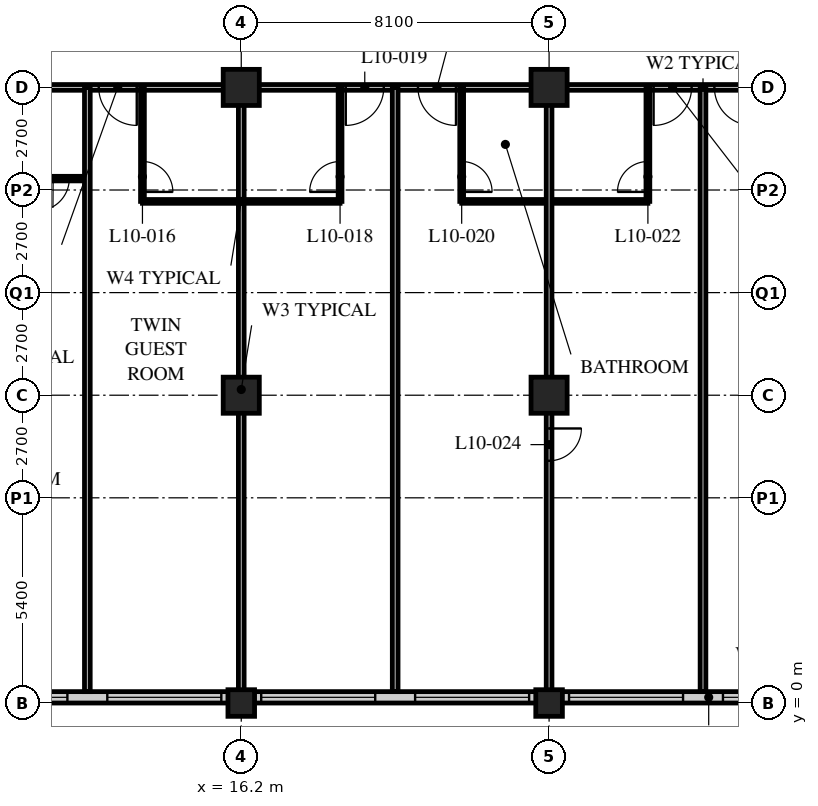
"""IFC4 building model, lengths in metres.
Left out: names, types, materials, properties, quantities, classifications, styles, units other than length and angle.
Written with IfcOpenShell. Run it as: python <this file> out.ifc"""

import sys

from ifc_helpers import new_model, si_unit, direction, frame, frame_2d, origin, origin_2d, place, context, subcontext, project, spatial, rectangle, hollow_rectangle, extrude, element, fill, save


model = new_model("IFC4")
c1 = context("Model", 3, precision=1e-05, world=origin(), true_north=direction((0.0, 1.0)))
c2 = subcontext(c1, "Body", "Model", "MODEL_VIEW")
j1 = project(units=[si_unit("LENGTHUNIT", "METRE"), si_unit("PLANEANGLEUNIT", "RADIAN")], contexts=[c1])
p1 = place(None, origin())
s1 = spatial("IfcSite", under=j1, at=p1, CompositionType="ELEMENT")
p2 = place(p1, origin())
s2 = spatial("IfcBuilding", under=s1, at=p2, CompositionType="ELEMENT")
p3 = place(p2, frame((0.0, 0.0, 46.6)))
s3 = spatial("IfcBuildingStorey", under=s2, at=p3, CompositionType="ELEMENT", Elevation=46.6)
p4 = place(p3, frame((16.2, 0.0, 0.0), z_axis=(0.0, 0.0, 1.0), x_axis=(1.0, 0.0, 0.0)))
e1 = element("IfcColumn", 1, at=p4, inside=s3, PredefinedType="COLUMN", context=c2, shape_type="SweptSolid", body=[
    extrude(hollow_rectangle(XDim=0.7, YDim=0.7, WallThickness=0.06, at=origin_2d()), origin(), (0.0, 0.0, 1.0), 3.4),
])
for number, where, z_axis, x_axis in (
    (2, (16.2, 8.1, 0.0), (0.0, 0.0, 1.0), (1.0, 0.0, 0.0)),
    (3, (16.2, 16.2, 0.0), (0.0, 0.0, 1.0), (1.0, 0.0, 0.0)),
):
    element("IfcColumn", number, at=place(p3, frame(where, z_axis=z_axis, x_axis=x_axis)), inside=s3, PredefinedType="COLUMN", context=c2, shape_type="SweptSolid", body=[
        extrude(hollow_rectangle(XDim=0.95, YDim=0.95, WallThickness=0.095, at=origin_2d()), origin(), (0.0, 0.0, 1.0), 3.4),
    ])
p5 = place(p3, frame((24.3, 0.0, 0.0), z_axis=(0.0, 0.0, 1.0), x_axis=(1.0, 0.0, 0.0)))
e4 = element("IfcColumn", 4, at=p5, inside=s3, PredefinedType="COLUMN", context=c2, shape_type="SweptSolid", body=[
    extrude(hollow_rectangle(XDim=0.7, YDim=0.7, WallThickness=0.06, at=origin_2d()), origin(), (0.0, 0.0, 1.0), 3.4),
])
for number, where, z_axis, x_axis in (
    (5, (24.3, 8.1, 0.0), (0.0, 0.0, 1.0), (1.0, 0.0, 0.0)),
    (6, (24.3, 16.2, 0.0), (0.0, 0.0, 1.0), (1.0, 0.0, 0.0)),
):
    element("IfcColumn", number, at=place(p3, frame(where, z_axis=z_axis, x_axis=x_axis)), inside=s3, PredefinedType="COLUMN", context=c2, shape_type="SweptSolid", body=[
        extrude(hollow_rectangle(XDim=0.95, YDim=0.95, WallThickness=0.095, at=origin_2d()), origin(), (0.0, 0.0, 1.0), 3.4),
    ])
p6 = place(p3, frame((8.4, 0.15, 0.0), z_axis=(0.0, 0.0, 1.0), x_axis=(1.0, 0.0, 0.0)))
e7 = element("IfcWall", 7, at=p6, inside=s3, PredefinedType="SOLIDWALL", context=c2, shape_type="SweptSolid", body=[
    extrude(rectangle(XDim=40.2, YDim=0.3, at=frame_2d((20.1, 0.0))), origin(), (0.0, 0.0, 1.0), 3.19),
])
p7 = place(p6, frame((0.225, 0.0, 0.9)))
e8 = element("IfcOpeningElement", 8, at=p7, cuts=e7, PredefinedType="OPENING", context=c2, shape_type="SweptSolid", body=[
    extrude(rectangle(XDim=3.0, YDim=2.0, at=frame_2d((1.5, 1.0))), frame((0.0, 0.16, 0.0), z_axis=(0.0, -1.0, 0.0), x_axis=(1.0, 0.0, 0.0)), (0.0, 0.0, 1.0), 0.32),
])
p8 = place(p6, frame((4.275, 0.0, 0.9)))
e9 = element("IfcOpeningElement", 9, at=p8, cuts=e7, PredefinedType="OPENING", context=c2, shape_type="SweptSolid", body=[
    extrude(rectangle(XDim=3.0, YDim=2.0, at=frame_2d((1.5, 1.0))), frame((0.0, 0.16, 0.0), z_axis=(0.0, -1.0, 0.0), x_axis=(1.0, 0.0, 0.0)), (0.0, 0.0, 1.0), 0.32),
])
p9 = place(p6, frame((8.325, 0.0, 0.9)))
e10 = element("IfcOpeningElement", 10, at=p9, cuts=e7, PredefinedType="OPENING", context=c2, shape_type="SweptSolid", body=[
    extrude(rectangle(XDim=3.0, YDim=2.0, at=frame_2d((1.5, 1.0))), frame((0.0, 0.16, 0.0), z_axis=(0.0, -1.0, 0.0), x_axis=(1.0, 0.0, 0.0)), (0.0, 0.0, 1.0), 0.32),
])
p10 = place(p6, frame((12.375, 0.0, 0.9)))
e11 = element("IfcOpeningElement", 11, at=p10, cuts=e7, PredefinedType="OPENING", context=c2, shape_type="SweptSolid", body=[
    extrude(rectangle(XDim=3.0, YDim=2.0, at=frame_2d((1.5, 1.0))), frame((0.0, 0.16, 0.0), z_axis=(0.0, -1.0, 0.0), x_axis=(1.0, 0.0, 0.0)), (0.0, 0.0, 1.0), 0.32),
])
p11 = place(p6, frame((16.425, 0.0, 0.9)))
e12 = element("IfcOpeningElement", 12, at=p11, cuts=e7, PredefinedType="OPENING", context=c2, shape_type="SweptSolid", body=[
    extrude(rectangle(XDim=3.0, YDim=2.0, at=frame_2d((1.5, 1.0))), frame((0.0, 0.16, 0.0), z_axis=(0.0, -1.0, 0.0), x_axis=(1.0, 0.0, 0.0)), (0.0, 0.0, 1.0), 0.32),
])
p12 = place(p6, frame((20.475, 0.0, 0.9)))
e13 = element("IfcOpeningElement", 13, at=p12, cuts=e7, PredefinedType="OPENING", context=c2, shape_type="SweptSolid", body=[
    extrude(rectangle(XDim=3.0, YDim=2.0, at=frame_2d((1.5, 1.0))), frame((0.0, 0.16, 0.0), z_axis=(0.0, -1.0, 0.0), x_axis=(1.0, 0.0, 0.0)), (0.0, 0.0, 1.0), 0.32),
])
p13 = place(p6, frame((24.525, 0.0, 0.9)))
e14 = element("IfcOpeningElement", 14, at=p13, cuts=e7, PredefinedType="OPENING", context=c2, shape_type="SweptSolid", body=[
    extrude(rectangle(XDim=3.0, YDim=2.0, at=frame_2d((1.5, 1.0))), frame((0.0, 0.16, 0.0), z_axis=(0.0, -1.0, 0.0), x_axis=(1.0, 0.0, 0.0)), (0.0, 0.0, 1.0), 0.32),
])
p14 = place(p6, frame((28.575, 0.0, 0.9)))
e15 = element("IfcOpeningElement", 15, at=p14, cuts=e7, PredefinedType="OPENING", context=c2, shape_type="SweptSolid", body=[
    extrude(rectangle(XDim=3.0, YDim=2.0, at=frame_2d((1.5, 1.0))), frame((0.0, 0.16, 0.0), z_axis=(0.0, -1.0, 0.0), x_axis=(1.0, 0.0, 0.0)), (0.0, 0.0, 1.0), 0.32),
])
p15 = place(p6, frame((32.625, 0.0, 0.9)))
e16 = element("IfcOpeningElement", 16, at=p15, cuts=e7, PredefinedType="OPENING", context=c2, shape_type="SweptSolid", body=[
    extrude(rectangle(XDim=3.0, YDim=2.0, at=frame_2d((1.5, 1.0))), frame((0.0, 0.16, 0.0), z_axis=(0.0, -1.0, 0.0), x_axis=(1.0, 0.0, 0.0)), (0.0, 0.0, 1.0), 0.32),
])
p16 = place(p6, frame((36.675, 0.0, 0.9)))
e17 = element("IfcOpeningElement", 17, at=p16, cuts=e7, PredefinedType="OPENING", context=c2, shape_type="SweptSolid", body=[
    extrude(rectangle(XDim=3.0, YDim=2.0, at=frame_2d((1.5, 1.0))), frame((0.0, 0.16, 0.0), z_axis=(0.0, -1.0, 0.0), x_axis=(1.0, 0.0, 0.0)), (0.0, 0.0, 1.0), 0.32),
])
p17 = place(p3, frame((8.1, 16.2, 0.0), z_axis=(0.0, 0.0, 1.0), x_axis=(1.0, 0.0, 0.0)))
e18 = element("IfcWall", 18, at=p17, inside=s3, PredefinedType="PARTITIONING", context=c2, shape_type="SweptSolid", body=[
    extrude(rectangle(XDim=40.5, YDim=0.15, at=frame_2d((20.25, 0.0))), origin(), (0.0, 0.0, 1.0), 2.578),
])
p18 = place(p17, frame((4.35, 0.0, 0.0)))
e19 = element("IfcOpeningElement", 19, at=p18, cuts=e18, PredefinedType="OPENING", context=c2, shape_type="SweptSolid", body=[
    extrude(rectangle(XDim=1.0, YDim=2.1, at=frame_2d((0.5, 1.05))), frame((0.0, 0.085, 0.0), z_axis=(0.0, -1.0, 0.0), x_axis=(1.0, 0.0, 0.0)), (0.0, 0.0, 1.0), 0.17),
])
p19 = place(p17, frame((10.85, 0.0, 0.0)))
e20 = element("IfcOpeningElement", 20, at=p19, cuts=e18, PredefinedType="OPENING", context=c2, shape_type="SweptSolid", body=[
    extrude(rectangle(XDim=1.0, YDim=2.1, at=frame_2d((0.5, 1.05))), frame((0.0, 0.085, 0.0), z_axis=(0.0, -1.0, 0.0), x_axis=(1.0, 0.0, 0.0)), (0.0, 0.0, 1.0), 0.17),
])
p20 = place(p17, frame((12.75, 0.0, 0.0)))
e21 = element("IfcOpeningElement", 21, at=p20, cuts=e18, PredefinedType="OPENING", context=c2, shape_type="SweptSolid", body=[
    extrude(rectangle(XDim=1.0, YDim=2.1, at=frame_2d((0.5, 1.05))), frame((0.0, 0.085, 0.0), z_axis=(0.0, -1.0, 0.0), x_axis=(1.0, 0.0, 0.0)), (0.0, 0.0, 1.0), 0.17),
])
p21 = place(p17, frame((18.95, 0.0, 0.0)))
e22 = element("IfcOpeningElement", 22, at=p21, cuts=e18, PredefinedType="OPENING", context=c2, shape_type="SweptSolid", body=[
    extrude(rectangle(XDim=1.0, YDim=2.1, at=frame_2d((0.5, 1.05))), frame((0.0, 0.085, 0.0), z_axis=(0.0, -1.0, 0.0), x_axis=(1.0, 0.0, 0.0)), (0.0, 0.0, 1.0), 0.17),
])
p22 = place(p17, frame((20.55, 0.0, 0.0)))
e23 = element("IfcOpeningElement", 23, at=p22, cuts=e18, PredefinedType="OPENING", context=c2, shape_type="SweptSolid", body=[
    extrude(rectangle(XDim=1.0, YDim=2.1, at=frame_2d((0.5, 1.05))), frame((0.0, 0.085, 0.0), z_axis=(0.0, -1.0, 0.0), x_axis=(1.0, 0.0, 0.0)), (0.0, 0.0, 1.0), 0.17),
])
p23 = place(p17, frame((27.05, 0.0, 0.0)))
e24 = element("IfcOpeningElement", 24, at=p23, cuts=e18, PredefinedType="OPENING", context=c2, shape_type="SweptSolid", body=[
    extrude(rectangle(XDim=1.0, YDim=2.1, at=frame_2d((0.5, 1.05))), frame((0.0, 0.085, 0.0), z_axis=(0.0, -1.0, 0.0), x_axis=(1.0, 0.0, 0.0)), (0.0, 0.0, 1.0), 0.17),
])
p24 = place(p17, frame((28.95, 0.0, 0.0)))
e25 = element("IfcOpeningElement", 25, at=p24, cuts=e18, PredefinedType="OPENING", context=c2, shape_type="SweptSolid", body=[
    extrude(rectangle(XDim=1.0, YDim=2.1, at=frame_2d((0.5, 1.05))), frame((0.0, 0.085, 0.0), z_axis=(0.0, -1.0, 0.0), x_axis=(1.0, 0.0, 0.0)), (0.0, 0.0, 1.0), 0.17),
])
p25 = place(p17, frame((34.85, 0.0, 0.0)))
e26 = element("IfcOpeningElement", 26, at=p25, cuts=e18, PredefinedType="OPENING", context=c2, shape_type="SweptSolid", body=[
    extrude(rectangle(XDim=1.0, YDim=2.1, at=frame_2d((0.5, 1.05))), frame((0.0, 0.085, 0.0), z_axis=(0.0, -1.0, 0.0), x_axis=(1.0, 0.0, 0.0)), (0.0, 0.0, 1.0), 0.17),
])
p26 = place(p17, frame((1.525, 0.0, 0.0)))
e27 = element("IfcOpeningElement", 27, at=p26, cuts=e18, PredefinedType="OPENING", context=c2, shape_type="SweptSolid", body=[
    extrude(rectangle(XDim=1.0, YDim=2.1, at=frame_2d((0.5, 1.05))), frame((0.0, 0.085, 0.0), z_axis=(0.0, -1.0, 0.0), x_axis=(1.0, 0.0, 0.0)), (0.0, 0.0, 1.0), 0.17),
])
p27 = place(p17, frame((37.975, 0.0, 0.0)))
e28 = element("IfcOpeningElement", 28, at=p27, cuts=e18, PredefinedType="OPENING", context=c2, shape_type="SweptSolid", body=[
    extrude(rectangle(XDim=1.0, YDim=2.1, at=frame_2d((0.5, 1.05))), frame((0.0, 0.085, 0.0), z_axis=(0.0, -1.0, 0.0), x_axis=(1.0, 0.0, 0.0)), (0.0, 0.0, 1.0), 0.17),
])
p28 = place(p3, frame((13.6, 13.2, 0.0), z_axis=(0.0, 0.0, 1.0), x_axis=(1.0, 0.0, 0.0)))
e29 = element("IfcWall", 29, at=p28, inside=s3, PredefinedType="PARTITIONING", context=c2, shape_type="SweptSolid", body=[
    extrude(rectangle(XDim=5.2, YDim=0.1, at=frame_2d((2.6, 0.0))), origin(), (0.0, 0.0, 1.0), 3.19),
])
p29 = place(p3, frame((13.6, 16.2, 0.0), z_axis=(0.0, 0.0, 1.0), x_axis=(0.0, -1.0, 0.0)))
e30 = element("IfcWall", 30, at=p29, inside=s3, PredefinedType="PARTITIONING", context=c2, shape_type="SweptSolid", body=[
    extrude(rectangle(XDim=3.0, YDim=0.1, at=frame_2d((1.5, 0.0))), origin(), (0.0, 0.0, 1.0), 3.19),
])
p30 = place(p29, frame((1.95, 0.0, 0.0)))
e31 = element("IfcOpeningElement", 31, at=p30, cuts=e30, PredefinedType="OPENING", context=c2, shape_type="SweptSolid", body=[
    extrude(rectangle(XDim=0.8, YDim=2.1, at=frame_2d((0.4, 1.05))), frame((0.0, 0.06, 0.0), z_axis=(0.0, -1.0, 0.0), x_axis=(1.0, 0.0, 0.0)), (0.0, 0.0, 1.0), 0.12),
])
p31 = place(p3, frame((16.2, 16.2, 0.0), z_axis=(0.0, 0.0, 1.0), x_axis=(0.0, -1.0, 0.0)))
e32 = element("IfcWall", 32, at=p31, inside=s3, PredefinedType="PARTITIONING", context=c2, shape_type="SweptSolid", body=[
    extrude(rectangle(XDim=15.9, YDim=0.15, at=frame_2d((7.95, 0.0))), origin(), (0.0, 0.0, 1.0), 2.578),
])
p32 = place(p3, frame((18.8, 16.2, 0.0), z_axis=(0.0, 0.0, 1.0), x_axis=(0.0, -1.0, 0.0)))
e33 = element("IfcWall", 33, at=p32, inside=s3, PredefinedType="PARTITIONING", context=c2, shape_type="SweptSolid", body=[
    extrude(rectangle(XDim=3.0, YDim=0.1, at=frame_2d((1.5, 0.0))), origin(), (0.0, 0.0, 1.0), 3.19),
])
p33 = place(p32, frame((1.95, 0.0, 0.0)))
e34 = element("IfcOpeningElement", 34, at=p33, cuts=e33, PredefinedType="OPENING", context=c2, shape_type="SweptSolid", body=[
    extrude(rectangle(XDim=0.8, YDim=2.1, at=frame_2d((0.4, 1.05))), frame((0.0, 0.06, 0.0), z_axis=(0.0, -1.0, 0.0), x_axis=(1.0, 0.0, 0.0)), (0.0, 0.0, 1.0), 0.12),
])
p34 = place(p3, frame((20.25, 16.2, 0.0), z_axis=(0.0, 0.0, 1.0), x_axis=(0.0, -1.0, 0.0)))
e35 = element("IfcWall", 35, at=p34, inside=s3, PredefinedType="PARTITIONING", context=c2, shape_type="SweptSolid", body=[
    extrude(rectangle(XDim=15.9, YDim=0.15, at=frame_2d((7.95, 0.0))), origin(), (0.0, 0.0, 1.0), 3.19),
])
p35 = place(p3, frame((22.0, 13.2, 0.0), z_axis=(0.0, 0.0, 1.0), x_axis=(1.0, 0.0, 0.0)))
e36 = element("IfcWall", 36, at=p35, inside=s3, PredefinedType="PARTITIONING", context=c2, shape_type="SweptSolid", body=[
    extrude(rectangle(XDim=4.9, YDim=0.1, at=frame_2d((2.45, 0.0))), origin(), (0.0, 0.0, 1.0), 3.19),
])
p36 = place(p3, frame((22.0, 16.2, 0.0), z_axis=(0.0, 0.0, 1.0), x_axis=(0.0, -1.0, 0.0)))
e37 = element("IfcWall", 37, at=p36, inside=s3, PredefinedType="PARTITIONING", context=c2, shape_type="SweptSolid", body=[
    extrude(rectangle(XDim=3.0, YDim=0.1, at=frame_2d((1.5, 0.0))), origin(), (0.0, 0.0, 1.0), 3.19),
])
p37 = place(p36, frame((1.95, 0.0, 0.0)))
e38 = element("IfcOpeningElement", 38, at=p37, cuts=e37, PredefinedType="OPENING", context=c2, shape_type="SweptSolid", body=[
    extrude(rectangle(XDim=0.8, YDim=2.1, at=frame_2d((0.4, 1.05))), frame((0.0, 0.06, 0.0), z_axis=(0.0, -1.0, 0.0), x_axis=(1.0, 0.0, 0.0)), (0.0, 0.0, 1.0), 0.12),
])
p38 = place(p3, frame((26.9, 16.2, 0.0), z_axis=(0.0, 0.0, 1.0), x_axis=(0.0, -1.0, 0.0)))
e39 = element("IfcWall", 39, at=p38, inside=s3, PredefinedType="PARTITIONING", context=c2, shape_type="SweptSolid", body=[
    extrude(rectangle(XDim=3.0, YDim=0.1, at=frame_2d((1.5, 0.0))), origin(), (0.0, 0.0, 1.0), 3.19),
])
p39 = place(p38, frame((1.95, 0.0, 0.0)))
e40 = element("IfcOpeningElement", 40, at=p39, cuts=e39, PredefinedType="OPENING", context=c2, shape_type="SweptSolid", body=[
    extrude(rectangle(XDim=0.8, YDim=2.1, at=frame_2d((0.4, 1.05))), frame((0.0, 0.06, 0.0), z_axis=(0.0, -1.0, 0.0), x_axis=(1.0, 0.0, 0.0)), (0.0, 0.0, 1.0), 0.12),
])
p40 = place(p3, frame((24.3, 16.2, 0.0), z_axis=(0.0, 0.0, 1.0), x_axis=(0.0, -1.0, 0.0)))
e41 = element("IfcWall", 41, at=p40, inside=s3, PredefinedType="PARTITIONING", context=c2, shape_type="SweptSolid", body=[
    extrude(rectangle(XDim=15.9, YDim=0.15, at=frame_2d((7.95, 0.0))), origin(), (0.0, 0.0, 1.0), 2.578),
])
p41 = place(p40, frame((8.975, 0.0, 0.0)))
e42 = element("IfcOpeningElement", 42, at=p41, cuts=e41, PredefinedType="OPENING", context=c2, shape_type="SweptSolid", body=[
    extrude(rectangle(XDim=0.85, YDim=2.1, at=frame_2d((0.425, 1.05))), frame((0.0, 0.085, 0.0), z_axis=(0.0, -1.0, 0.0), x_axis=(1.0, 0.0, 0.0)), (0.0, 0.0, 1.0), 0.17),
])
p42 = place(p3, frame((28.35, 16.2, 0.0), z_axis=(0.0, 0.0, 1.0), x_axis=(0.0, -1.0, 0.0)))
e43 = element("IfcWall", 43, at=p42, inside=s3, PredefinedType="PARTITIONING", context=c2, shape_type="SweptSolid", body=[
    extrude(rectangle(XDim=15.9, YDim=0.15, at=frame_2d((7.95, 0.0))), origin(), (0.0, 0.0, 1.0), 3.19),
])
p43 = place(p3, frame((4.1, 13.8, 0.0), z_axis=(0.0, 0.0, 1.0), x_axis=(1.0, 0.0, 0.0)))
e44 = element("IfcWall", 44, at=p43, inside=s3, PredefinedType="PARTITIONING", context=c2, shape_type="SweptSolid", body=[
    extrude(rectangle(XDim=8.05, YDim=0.12, at=frame_2d((4.025, 0.0))), origin(), (0.0, 0.0, 1.0), 3.19),
])
p44 = place(p43, frame((6.725, 0.0, 0.0)))
e45 = element("IfcOpeningElement", 45, at=p44, cuts=e44, PredefinedType="OPENING", context=c2, shape_type="SweptSolid", body=[
    extrude(rectangle(XDim=0.85, YDim=2.1, at=frame_2d((0.425, 1.05))), frame((0.0, 0.07, 0.0), z_axis=(0.0, -1.0, 0.0), x_axis=(1.0, 0.0, 0.0)), (0.0, 0.0, 1.0), 0.14),
])
p45 = place(p43, frame((2.875, 0.0, 0.0)))
e46 = element("IfcOpeningElement", 46, at=p45, cuts=e44, PredefinedType="OPENING", context=c2, shape_type="SweptSolid", body=[
    extrude(rectangle(XDim=0.85, YDim=2.1, at=frame_2d((0.425, 1.05))), frame((0.0, 0.07, 0.0), z_axis=(0.0, -1.0, 0.0), x_axis=(1.0, 0.0, 0.0)), (0.0, 0.0, 1.0), 0.14),
])
p46 = place(p3, frame((12.15, 16.2, 0.0), z_axis=(0.0, 0.0, 1.0), x_axis=(0.0, -1.0, 0.0)))
e47 = element("IfcWall", 47, at=p46, inside=s3, PredefinedType="PARTITIONING", context=c2, shape_type="SweptSolid", body=[
    extrude(rectangle(XDim=15.9, YDim=0.15, at=frame_2d((7.95, 0.0))), origin(), (0.0, 0.0, 1.0), 3.19),
])
p47 = place(p7, origin())
e48 = element("IfcWindow", 48, at=p47, inside=s3, PartitioningType="SINGLE_PANEL", PredefinedType="WINDOW", context=c2, shape_type="SweptSolid", body=[
    extrude(rectangle(XDim=3.0, YDim=2.0, at=frame_2d((1.5, 1.0))), frame((0.0, 0.03, 0.0), z_axis=(0.0, -1.0, 0.0), x_axis=(1.0, 0.0, 0.0)), (0.0, 0.0, 1.0), 0.06),
])
fill(e8, e48)
p48 = place(p8, origin())
e49 = element("IfcWindow", 49, at=p48, inside=s3, PartitioningType="SINGLE_PANEL", PredefinedType="WINDOW", context=c2, shape_type="SweptSolid", body=[
    extrude(rectangle(XDim=3.0, YDim=2.0, at=frame_2d((1.5, 1.0))), frame((0.0, 0.03, 0.0), z_axis=(0.0, -1.0, 0.0), x_axis=(1.0, 0.0, 0.0)), (0.0, 0.0, 1.0), 0.06),
])
fill(e9, e49)
p49 = place(p9, origin())
e50 = element("IfcWindow", 50, at=p49, inside=s3, PartitioningType="SINGLE_PANEL", PredefinedType="WINDOW", context=c2, shape_type="SweptSolid", body=[
    extrude(rectangle(XDim=3.0, YDim=2.0, at=frame_2d((1.5, 1.0))), frame((0.0, 0.03, 0.0), z_axis=(0.0, -1.0, 0.0), x_axis=(1.0, 0.0, 0.0)), (0.0, 0.0, 1.0), 0.06),
])
fill(e10, e50)
p50 = place(p10, origin())
e51 = element("IfcWindow", 51, at=p50, inside=s3, PartitioningType="SINGLE_PANEL", PredefinedType="WINDOW", context=c2, shape_type="SweptSolid", body=[
    extrude(rectangle(XDim=3.0, YDim=2.0, at=frame_2d((1.5, 1.0))), frame((0.0, 0.03, 0.0), z_axis=(0.0, -1.0, 0.0), x_axis=(1.0, 0.0, 0.0)), (0.0, 0.0, 1.0), 0.06),
])
fill(e11, e51)
p51 = place(p11, origin())
e52 = element("IfcWindow", 52, at=p51, inside=s3, PartitioningType="SINGLE_PANEL", PredefinedType="WINDOW", context=c2, shape_type="SweptSolid", body=[
    extrude(rectangle(XDim=3.0, YDim=2.0, at=frame_2d((1.5, 1.0))), frame((0.0, 0.03, 0.0), z_axis=(0.0, -1.0, 0.0), x_axis=(1.0, 0.0, 0.0)), (0.0, 0.0, 1.0), 0.06),
])
fill(e12, e52)
p52 = place(p12, origin())
e53 = element("IfcWindow", 53, at=p52, inside=s3, PartitioningType="SINGLE_PANEL", PredefinedType="WINDOW", context=c2, shape_type="SweptSolid", body=[
    extrude(rectangle(XDim=3.0, YDim=2.0, at=frame_2d((1.5, 1.0))), frame((0.0, 0.03, 0.0), z_axis=(0.0, -1.0, 0.0), x_axis=(1.0, 0.0, 0.0)), (0.0, 0.0, 1.0), 0.06),
])
fill(e13, e53)
p53 = place(p30, origin())
e54 = element("IfcDoor", 54, at=p53, inside=s3, OperationType="SINGLE_SWING_RIGHT", PredefinedType="DOOR", context=c2, shape_type="SweptSolid", body=[
    extrude(rectangle(XDim=0.8, YDim=2.1, at=frame_2d((0.4, 1.05))), frame((0.0, 0.025, 0.0), z_axis=(0.0, -1.0, 0.0), x_axis=(1.0, 0.0, 0.0)), (0.0, 0.0, 1.0), 0.05),
])
fill(e31, e54)
p54 = place(p18, origin())
e55 = element("IfcDoor", 55, at=p54, inside=s3, OperationType="SINGLE_SWING_LEFT", PredefinedType="DOOR", context=c2, shape_type="SweptSolid", body=[
    extrude(rectangle(XDim=1.0, YDim=2.1, at=frame_2d((0.5, 1.05))), frame((0.0, 0.025, 0.0), z_axis=(0.0, -1.0, 0.0), x_axis=(1.0, 0.0, 0.0)), (0.0, 0.0, 1.0), 0.05),
])
fill(e19, e55)
p55 = place(p33, origin())
e56 = element("IfcDoor", 56, at=p55, inside=s3, OperationType="SINGLE_SWING_LEFT", PredefinedType="DOOR", context=c2, shape_type="SweptSolid", body=[
    extrude(rectangle(XDim=0.8, YDim=2.1, at=frame_2d((0.4, 1.05))), frame((0.0, 0.025, 0.0), z_axis=(0.0, -1.0, 0.0), x_axis=(1.0, 0.0, 0.0)), (0.0, 0.0, 1.0), 0.05),
])
fill(e34, e56)
p56 = place(p19, origin())
e57 = element("IfcDoor", 57, at=p56, inside=s3, OperationType="SINGLE_SWING_RIGHT", PredefinedType="DOOR", context=c2, shape_type="SweptSolid", body=[
    extrude(rectangle(XDim=1.0, YDim=2.1, at=frame_2d((0.5, 1.05))), frame((0.0, 0.025, 0.0), z_axis=(0.0, -1.0, 0.0), x_axis=(1.0, 0.0, 0.0)), (0.0, 0.0, 1.0), 0.05),
])
fill(e20, e57)
p57 = place(p37, origin())
e58 = element("IfcDoor", 58, at=p57, inside=s3, OperationType="SINGLE_SWING_RIGHT", PredefinedType="DOOR", context=c2, shape_type="SweptSolid", body=[
    extrude(rectangle(XDim=0.8, YDim=2.1, at=frame_2d((0.4, 1.05))), frame((0.0, 0.025, 0.0), z_axis=(0.0, -1.0, 0.0), x_axis=(1.0, 0.0, 0.0)), (0.0, 0.0, 1.0), 0.05),
])
fill(e38, e58)
p58 = place(p20, origin())
e59 = element("IfcDoor", 59, at=p58, inside=s3, OperationType="SINGLE_SWING_LEFT", PredefinedType="DOOR", context=c2, shape_type="SweptSolid", body=[
    extrude(rectangle(XDim=1.0, YDim=2.1, at=frame_2d((0.5, 1.05))), frame((0.0, 0.025, 0.0), z_axis=(0.0, -1.0, 0.0), x_axis=(1.0, 0.0, 0.0)), (0.0, 0.0, 1.0), 0.05),
])
fill(e21, e59)
p59 = place(p39, origin())
e60 = element("IfcDoor", 60, at=p59, inside=s3, OperationType="SINGLE_SWING_LEFT", PredefinedType="DOOR", context=c2, shape_type="SweptSolid", body=[
    extrude(rectangle(XDim=0.8, YDim=2.1, at=frame_2d((0.4, 1.05))), frame((0.0, 0.025, 0.0), z_axis=(0.0, -1.0, 0.0), x_axis=(1.0, 0.0, 0.0)), (0.0, 0.0, 1.0), 0.05),
])
fill(e40, e60)
p60 = place(p21, origin())
e61 = element("IfcDoor", 61, at=p60, inside=s3, OperationType="SINGLE_SWING_RIGHT", PredefinedType="DOOR", context=c2, shape_type="SweptSolid", body=[
    extrude(rectangle(XDim=1.0, YDim=2.1, at=frame_2d((0.5, 1.05))), frame((0.0, 0.025, 0.0), z_axis=(0.0, -1.0, 0.0), x_axis=(1.0, 0.0, 0.0)), (0.0, 0.0, 1.0), 0.05),
])
fill(e22, e61)
p61 = place(p41, origin())
e62 = element("IfcDoor", 62, at=p61, inside=s3, OperationType="SINGLE_SWING_LEFT", PredefinedType="DOOR", context=c2, shape_type="SweptSolid", body=[
    extrude(rectangle(XDim=0.85, YDim=2.1, at=frame_2d((0.425, 1.05))), frame((0.0, 0.025, 0.0), z_axis=(0.0, -1.0, 0.0), x_axis=(1.0, 0.0, 0.0)), (0.0, 0.0, 1.0), 0.05),
])
fill(e42, e62)
p62 = place(p22, origin())
e63 = element("IfcDoor", 63, at=p62, inside=s3, OperationType="SINGLE_SWING_LEFT", PredefinedType="DOOR", context=c2, shape_type="SweptSolid", body=[
    extrude(rectangle(XDim=1.0, YDim=2.1, at=frame_2d((0.5, 1.05))), frame((0.0, 0.025, 0.0), z_axis=(0.0, -1.0, 0.0), x_axis=(1.0, 0.0, 0.0)), (0.0, 0.0, 1.0), 0.05),
])
fill(e23, e63)
p63 = place(p44, origin())
e64 = element("IfcDoor", 64, at=p63, inside=s3, OperationType="SINGLE_SWING_RIGHT", PredefinedType="DOOR", context=c2, shape_type="SweptSolid", body=[
    extrude(rectangle(XDim=0.85, YDim=2.1, at=frame_2d((0.425, 1.05))), frame((0.0, 0.025, 0.0), z_axis=(0.0, -1.0, 0.0), x_axis=(1.0, 0.0, 0.0)), (0.0, 0.0, 1.0), 0.05),
])
fill(e45, e64)
save(model, sys.argv[1])
